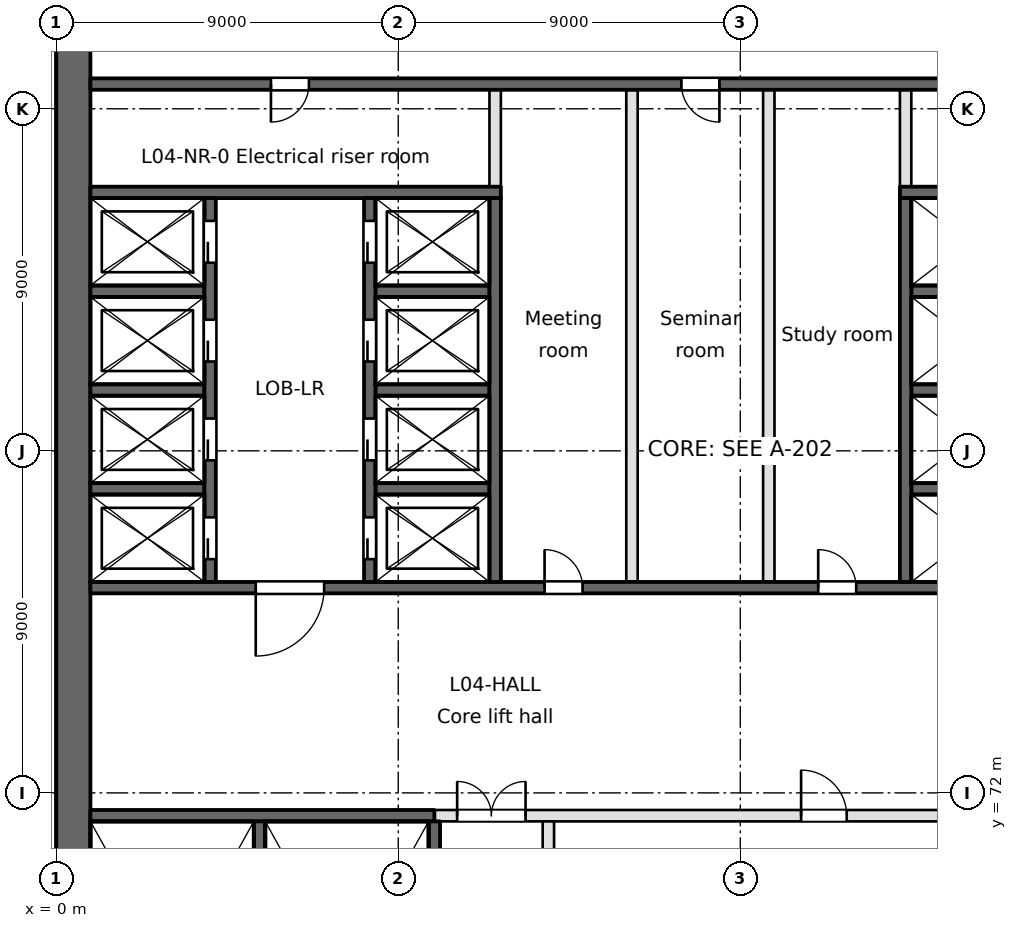
"""IFC4 building model, lengths in metres.
Left out: names, types, materials, properties, quantities, classifications, styles, units other than length and angle.
Written with IfcOpenShell. Run it as: python <this file> out.ifc"""

import sys

from ifc_helpers import new_model, si_unit, direction, frame, frame_2d, origin, place, context, subcontext, project, spatial, rectangle, extrude, element, fill, save


model = new_model("IFC4")
c1 = context("Model", 3, precision=1e-05, world=origin(), true_north=direction((0.0, 1.0)))
c2 = subcontext(c1, "Body", "Model", "MODEL_VIEW")
j1 = project(units=[si_unit("LENGTHUNIT", "METRE"), si_unit("PLANEANGLEUNIT", "RADIAN")], contexts=[c1])
p1 = place(None, origin())
s1 = spatial("IfcSite", under=j1, at=p1, CompositionType="ELEMENT")
p2 = place(p1, origin())
s2 = spatial("IfcBuilding", under=s1, at=p2, CompositionType="ELEMENT")
p3 = place(p2, frame((0.0, 0.0, 21.6)))
s3 = spatial("IfcBuildingStorey", under=s2, at=p3, CompositionType="ELEMENT", Elevation=21.6)
p4 = place(p3, frame((0.45, 94.5, 0.0), z_axis=(0.0, 0.0, 1.0), x_axis=(0.0, -1.0, 0.0)))
e1 = element("IfcWall", 1, at=p4, inside=s3, PredefinedType="SHEAR", context=c2, shape_type="SweptSolid", body=[
    extrude(rectangle(XDim=66.085, YDim=0.9, at=frame_2d((33.042, 0.0))), origin(), (0.0, 0.0, 1.0), 4.8),
])
p5 = place(p3, frame((0.9, 71.4, -0.35), z_axis=(0.0, 0.0, 1.0), x_axis=(1.0, 0.0, 0.0)))
e2 = element("IfcWall", 2, at=p5, inside=s3, PredefinedType="SOLIDWALL", context=c2, shape_type="SweptSolid", body=[
    extrude(rectangle(XDim=9.05, YDim=0.3, at=frame_2d((4.525, 0.0))), origin(), (0.0, 0.0, 1.0), 4.8),
])
p6 = place(p3, frame((9.95, 71.4, 0.0), z_axis=(0.0, 0.0, 1.0), x_axis=(1.0, 0.0, 0.0)))
e3 = element("IfcWall", 3, at=p6, inside=s3, PredefinedType="PARTITIONING", context=c2, shape_type="SweptSolid", body=[
    extrude(rectangle(XDim=17.65, YDim=0.3, at=frame_2d((8.825, 0.0))), origin(), (0.0, 0.0, 1.0), 4.45),
])
p7 = place(p6, frame((0.6, 0.0, 0.0)))
e4 = element("IfcOpeningElement", 4, at=p7, cuts=e3, PredefinedType="OPENING", context=c2, shape_type="SweptSolid", body=[
    extrude(rectangle(XDim=1.8, YDim=2.1, at=frame_2d((0.9, 1.05))), frame((0.0, 0.15, 0.0), z_axis=(0.0, -1.0, 0.0), x_axis=(1.0, 0.0, 0.0)), (0.0, 0.0, 1.0), 0.3),
])
p8 = place(p6, frame((9.65, 0.0, 0.0)))
e5 = element("IfcOpeningElement", 5, at=p8, cuts=e3, PredefinedType="OPENING", context=c2, shape_type="SweptSolid", body=[
    extrude(rectangle(XDim=1.2, YDim=2.1, at=frame_2d((0.6, 1.05))), frame((0.0, 0.15, 0.0), z_axis=(0.0, -1.0, 0.0), x_axis=(1.0, 0.0, 0.0)), (0.0, 0.0, 1.0), 0.3),
])
p9 = place(p3, frame((0.9, 77.4, -0.35), z_axis=(0.0, 0.0, 1.0), x_axis=(1.0, 0.0, 0.0)))
e6 = element("IfcWall", 6, at=p9, inside=s3, PredefinedType="SOLIDWALL", context=c2, shape_type="SweptSolid", body=[
    extrude(rectangle(XDim=28.95, YDim=0.3, at=frame_2d((14.475, 0.0))), origin(), (0.0, 0.0, 1.0), 4.8),
])
p10 = place(p9, frame((4.35, 0.0, 0.35)))
e7 = element("IfcOpeningElement", 7, at=p10, cuts=e6, PredefinedType="OPENING", context=c2, shape_type="SweptSolid", body=[
    extrude(rectangle(XDim=1.8, YDim=2.1, at=frame_2d((0.9, 1.05))), frame((0.0, 0.15, 0.0), z_axis=(0.0, -1.0, 0.0), x_axis=(1.0, 0.0, 0.0)), (0.0, 0.0, 1.0), 0.3),
])
p11 = place(p9, frame((25.95, 0.0, 0.35)))
e8 = element("IfcOpeningElement", 8, at=p11, cuts=e6, PredefinedType="OPENING", context=c2, shape_type="SweptSolid", body=[
    extrude(rectangle(XDim=1.8, YDim=2.1, at=frame_2d((0.9, 1.05))), frame((0.0, 0.15, 0.0), z_axis=(0.0, -1.0, 0.0), x_axis=(1.0, 0.0, 0.0)), (0.0, 0.0, 1.0), 0.3),
])
p12 = place(p9, frame((11.95, 0.0, 0.35)))
e9 = element("IfcOpeningElement", 9, at=p12, cuts=e6, PredefinedType="OPENING", context=c2, shape_type="SweptSolid", body=[
    extrude(rectangle(XDim=1.0, YDim=2.1, at=frame_2d((0.5, 1.05))), frame((0.0, 0.15, 0.0), z_axis=(0.0, -1.0, 0.0), x_axis=(1.0, 0.0, 0.0)), (0.0, 0.0, 1.0), 0.3),
])
p13 = place(p9, frame((19.15, 0.0, 0.35)))
e10 = element("IfcOpeningElement", 10, at=p13, cuts=e6, PredefinedType="OPENING", context=c2, shape_type="SweptSolid", body=[
    extrude(rectangle(XDim=1.0, YDim=2.1, at=frame_2d((0.5, 1.05))), frame((0.0, 0.15, 0.0), z_axis=(0.0, -1.0, 0.0), x_axis=(1.0, 0.0, 0.0)), (0.0, 0.0, 1.0), 0.3),
])
for number, where, z_axis, x_axis in (
    (11, (0.9, 80.0, -0.35), (0.0, 0.0, 1.0), (1.0, 0.0, 0.0)),
    (12, (8.4, 80.0, -0.35), (0.0, 0.0, 1.0), (1.0, 0.0, 0.0)),
    (13, (22.5, 80.0, -0.35), (0.0, 0.0, 1.0), (1.0, 0.0, 0.0)),
    (14, (0.9, 82.6, -0.35), (0.0, 0.0, 1.0), (1.0, 0.0, 0.0)),
    (15, (8.4, 82.6, -0.35), (0.0, 0.0, 1.0), (1.0, 0.0, 0.0)),
    (16, (22.5, 82.6, -0.35), (0.0, 0.0, 1.0), (1.0, 0.0, 0.0)),
    (17, (0.9, 85.2, -0.35), (0.0, 0.0, 1.0), (1.0, 0.0, 0.0)),
    (18, (8.4, 85.2, -0.35), (0.0, 0.0, 1.0), (1.0, 0.0, 0.0)),
    (19, (22.5, 85.2, -0.35), (0.0, 0.0, 1.0), (1.0, 0.0, 0.0)),
):
    element("IfcWall", number, at=place(p3, frame(where, z_axis=z_axis, x_axis=x_axis)), inside=s3, PredefinedType="SOLIDWALL", context=c2, shape_type="SweptSolid", body=[
        extrude(rectangle(XDim=3.0, YDim=0.3, at=frame_2d((1.5, 0.0))), origin(), (0.0, 0.0, 1.0), 4.8),
    ])
p14 = place(p3, frame((0.9, 87.8, -0.35), z_axis=(0.0, 0.0, 1.0), x_axis=(1.0, 0.0, 0.0)))
e20 = element("IfcWall", 20, at=p14, inside=s3, PredefinedType="SOLIDWALL", context=c2, shape_type="SweptSolid", body=[
    extrude(rectangle(XDim=10.8, YDim=0.3, at=frame_2d((5.4, 0.0))), origin(), (0.0, 0.0, 1.0), 4.8),
])
p15 = place(p3, frame((22.2, 87.8, -0.35), z_axis=(0.0, 0.0, 1.0), x_axis=(1.0, 0.0, 0.0)))
e21 = element("IfcWall", 21, at=p15, inside=s3, PredefinedType="SOLIDWALL", context=c2, shape_type="SweptSolid", body=[
    extrude(rectangle(XDim=7.8, YDim=0.3, at=frame_2d((3.9, 0.0))), origin(), (0.0, 0.0, 1.0), 4.8),
])
p16 = place(p3, frame((0.9, 90.65, -0.35), z_axis=(0.0, 0.0, 1.0), x_axis=(1.0, 0.0, 0.0)))
e22 = element("IfcWall", 22, at=p16, inside=s3, PredefinedType="SOLIDWALL", context=c2, shape_type="SweptSolid", body=[
    extrude(rectangle(XDim=34.6, YDim=0.3, at=frame_2d((17.3, 0.0))), origin(), (0.0, 0.0, 1.0), 4.8),
])
p17 = place(p16, frame((4.75, 0.0, 0.35)))
e23 = element("IfcOpeningElement", 23, at=p17, cuts=e22, PredefinedType="OPENING", context=c2, shape_type="SweptSolid", body=[
    extrude(rectangle(XDim=1.0, YDim=2.1, at=frame_2d((0.5, 1.05))), frame((0.0, 0.15, 0.0), z_axis=(0.0, -1.0, 0.0), x_axis=(1.0, 0.0, 0.0)), (0.0, 0.0, 1.0), 0.3),
])
p18 = place(p16, frame((24.7, 0.0, 0.35)))
e24 = element("IfcOpeningElement", 24, at=p18, cuts=e22, PredefinedType="OPENING", context=c2, shape_type="SweptSolid", body=[
    extrude(rectangle(XDim=1.0, YDim=2.1, at=frame_2d((0.5, 1.05))), frame((0.0, 0.15, 0.0), z_axis=(0.0, -1.0, 0.0), x_axis=(1.0, 0.0, 0.0)), (0.0, 0.0, 1.0), 0.3),
])
p19 = place(p16, frame((15.55, 0.0, 0.35)))
e25 = element("IfcOpeningElement", 25, at=p19, cuts=e22, PredefinedType="OPENING", context=c2, shape_type="SweptSolid", body=[
    extrude(rectangle(XDim=1.0, YDim=2.1, at=frame_2d((0.5, 1.05))), frame((0.0, 0.15, 0.0), z_axis=(0.0, -1.0, 0.0), x_axis=(1.0, 0.0, 0.0)), (0.0, 0.0, 1.0), 0.3),
])
p20 = place(p16, frame((31.4, 0.0, 0.35)))
e26 = element("IfcOpeningElement", 26, at=p20, cuts=e22, PredefinedType="OPENING", context=c2, shape_type="SweptSolid", body=[
    extrude(rectangle(XDim=1.0, YDim=2.1, at=frame_2d((0.5, 1.05))), frame((0.0, 0.15, 0.0), z_axis=(0.0, -1.0, 0.0), x_axis=(1.0, 0.0, 0.0)), (0.0, 0.0, 1.0), 0.3),
])
p21 = place(p3, frame((4.05, 77.55, -0.35), z_axis=(0.0, 0.0, 1.0), x_axis=(0.0, 1.0, 0.0)))
e27 = element("IfcWall", 27, at=p21, inside=s3, PredefinedType="SOLIDWALL", context=c2, shape_type="SweptSolid", body=[
    extrude(rectangle(XDim=10.1, YDim=0.3, at=frame_2d((5.05, 0.0))), origin(), (0.0, 0.0, 1.0), 4.8),
])
p22 = place(p21, frame((0.6, 0.0, 0.35)))
e28 = element("IfcOpeningElement", 28, at=p22, cuts=e27, PredefinedType="OPENING", context=c2, shape_type="SweptSolid", body=[
    extrude(rectangle(XDim=1.1, YDim=2.1, at=frame_2d((0.55, 1.05))), frame((0.0, 0.15, 0.0), z_axis=(0.0, -1.0, 0.0), x_axis=(1.0, 0.0, 0.0)), (0.0, 0.0, 1.0), 0.3),
])
p23 = place(p21, frame((3.2, 0.0, 0.35)))
e29 = element("IfcOpeningElement", 29, at=p23, cuts=e27, PredefinedType="OPENING", context=c2, shape_type="SweptSolid", body=[
    extrude(rectangle(XDim=1.1, YDim=2.1, at=frame_2d((0.55, 1.05))), frame((0.0, 0.15, 0.0), z_axis=(0.0, -1.0, 0.0), x_axis=(1.0, 0.0, 0.0)), (0.0, 0.0, 1.0), 0.3),
])
p24 = place(p21, frame((5.8, 0.0, 0.35)))
e30 = element("IfcOpeningElement", 30, at=p24, cuts=e27, PredefinedType="OPENING", context=c2, shape_type="SweptSolid", body=[
    extrude(rectangle(XDim=1.1, YDim=2.1, at=frame_2d((0.55, 1.05))), frame((0.0, 0.15, 0.0), z_axis=(0.0, -1.0, 0.0), x_axis=(1.0, 0.0, 0.0)), (0.0, 0.0, 1.0), 0.3),
])
p25 = place(p21, frame((8.4, 0.0, 0.35)))
e31 = element("IfcOpeningElement", 31, at=p25, cuts=e27, PredefinedType="OPENING", context=c2, shape_type="SweptSolid", body=[
    extrude(rectangle(XDim=1.1, YDim=2.1, at=frame_2d((0.55, 1.05))), frame((0.0, 0.15, 0.0), z_axis=(0.0, -1.0, 0.0), x_axis=(1.0, 0.0, 0.0)), (0.0, 0.0, 1.0), 0.3),
])
p26 = place(p3, frame((5.35, 63.5, -0.35), z_axis=(0.0, 0.0, 1.0), x_axis=(0.0, 1.0, 0.0)))
e32 = element("IfcWall", 32, at=p26, inside=s3, PredefinedType="SOLIDWALL", context=c2, shape_type="SweptSolid", body=[
    extrude(rectangle(XDim=7.75, YDim=0.3, at=frame_2d((3.875, 0.0))), origin(), (0.0, 0.0, 1.0), 4.8),
])
p27 = place(p3, frame((8.25, 77.55, -0.35), z_axis=(0.0, 0.0, 1.0), x_axis=(0.0, 1.0, 0.0)))
e33 = element("IfcWall", 33, at=p27, inside=s3, PredefinedType="SOLIDWALL", context=c2, shape_type="SweptSolid", body=[
    extrude(rectangle(XDim=10.1, YDim=0.3, at=frame_2d((5.05, 0.0))), origin(), (0.0, 0.0, 1.0), 4.8),
])
p28 = place(p27, frame((0.6, 0.0, 0.35)))
e34 = element("IfcOpeningElement", 34, at=p28, cuts=e33, PredefinedType="OPENING", context=c2, shape_type="SweptSolid", body=[
    extrude(rectangle(XDim=1.1, YDim=2.1, at=frame_2d((0.55, 1.05))), frame((0.0, 0.15, 0.0), z_axis=(0.0, -1.0, 0.0), x_axis=(1.0, 0.0, 0.0)), (0.0, 0.0, 1.0), 0.3),
])
p29 = place(p27, frame((3.2, 0.0, 0.35)))
e35 = element("IfcOpeningElement", 35, at=p29, cuts=e33, PredefinedType="OPENING", context=c2, shape_type="SweptSolid", body=[
    extrude(rectangle(XDim=1.1, YDim=2.1, at=frame_2d((0.55, 1.05))), frame((0.0, 0.15, 0.0), z_axis=(0.0, -1.0, 0.0), x_axis=(1.0, 0.0, 0.0)), (0.0, 0.0, 1.0), 0.3),
])
p30 = place(p27, frame((5.8, 0.0, 0.35)))
e36 = element("IfcOpeningElement", 36, at=p30, cuts=e33, PredefinedType="OPENING", context=c2, shape_type="SweptSolid", body=[
    extrude(rectangle(XDim=1.1, YDim=2.1, at=frame_2d((0.55, 1.05))), frame((0.0, 0.15, 0.0), z_axis=(0.0, -1.0, 0.0), x_axis=(1.0, 0.0, 0.0)), (0.0, 0.0, 1.0), 0.3),
])
p31 = place(p27, frame((8.4, 0.0, 0.35)))
e37 = element("IfcOpeningElement", 37, at=p31, cuts=e33, PredefinedType="OPENING", context=c2, shape_type="SweptSolid", body=[
    extrude(rectangle(XDim=1.1, YDim=2.1, at=frame_2d((0.55, 1.05))), frame((0.0, 0.15, 0.0), z_axis=(0.0, -1.0, 0.0), x_axis=(1.0, 0.0, 0.0)), (0.0, 0.0, 1.0), 0.3),
])
p32 = place(p3, frame((9.95, 63.5, -0.35), z_axis=(0.0, 0.0, 1.0), x_axis=(0.0, 1.0, 0.0)))
e38 = element("IfcWall", 38, at=p32, inside=s3, PredefinedType="SOLIDWALL", context=c2, shape_type="SweptSolid", body=[
    extrude(rectangle(XDim=7.75, YDim=0.3, at=frame_2d((3.875, 0.0))), origin(), (0.0, 0.0, 1.0), 4.8),
])
p33 = place(p3, frame((11.55, 77.55, -0.35), z_axis=(0.0, 0.0, 1.0), x_axis=(0.0, 1.0, 0.0)))
e39 = element("IfcWall", 39, at=p33, inside=s3, PredefinedType="SOLIDWALL", context=c2, shape_type="SweptSolid", body=[
    extrude(rectangle(XDim=10.1, YDim=0.3, at=frame_2d((5.05, 0.0))), origin(), (0.0, 0.0, 1.0), 4.8),
])
p34 = place(p3, frame((11.55, 87.95, 0.0), z_axis=(0.0, 0.0, 1.0), x_axis=(0.0, 1.0, 0.0)))
e40 = element("IfcWall", 40, at=p34, inside=s3, PredefinedType="PARTITIONING", context=c2, shape_type="SweptSolid", body=[
    extrude(rectangle(XDim=2.55, YDim=0.3, at=frame_2d((1.275, 0.0))), origin(), (0.0, 0.0, 1.0), 4.45),
])
p35 = place(p3, frame((12.95, 63.5, 0.0), z_axis=(0.0, 0.0, 1.0), x_axis=(0.0, 1.0, 0.0)))
e41 = element("IfcWall", 41, at=p35, inside=s3, PredefinedType="PARTITIONING", context=c2, shape_type="SweptSolid", body=[
    extrude(rectangle(XDim=7.75, YDim=0.3, at=frame_2d((3.875, 0.0))), origin(), (0.0, 0.0, 1.0), 4.45),
])
for number, where, z_axis, x_axis in (
    (42, (15.15, 77.55, 0.0), (0.0, 0.0, 1.0), (0.0, 1.0, 0.0)),
    (43, (18.75, 77.55, 0.0), (0.0, 0.0, 1.0), (0.0, 1.0, 0.0)),
):
    element("IfcWall", number, at=place(p3, frame(where, z_axis=z_axis, x_axis=x_axis)), inside=s3, PredefinedType="PARTITIONING", context=c2, shape_type="SweptSolid", body=[
        extrude(rectangle(XDim=12.95, YDim=0.3, at=frame_2d((6.475, 0.0))), origin(), (0.0, 0.0, 1.0), 4.45),
    ])
p36 = place(p3, frame((22.35, 77.55, -0.35), z_axis=(0.0, 0.0, 1.0), x_axis=(0.0, 1.0, 0.0)))
e44 = element("IfcWall", 44, at=p36, inside=s3, PredefinedType="SOLIDWALL", context=c2, shape_type="SweptSolid", body=[
    extrude(rectangle(XDim=10.1, YDim=0.3, at=frame_2d((5.05, 0.0))), origin(), (0.0, 0.0, 1.0), 4.8),
])
p37 = place(p3, frame((22.35, 87.95, 0.0), z_axis=(0.0, 0.0, 1.0), x_axis=(0.0, 1.0, 0.0)))
e45 = element("IfcWall", 45, at=p37, inside=s3, PredefinedType="PARTITIONING", context=c2, shape_type="SweptSolid", body=[
    extrude(rectangle(XDim=2.55, YDim=0.3, at=frame_2d((1.275, 0.0))), origin(), (0.0, 0.0, 1.0), 4.45),
])
p38 = place(p22, origin())
e46 = element("IfcDoor", 46, at=p38, inside=s3, OperationType="SLIDING_TO_RIGHT", PredefinedType="DOOR", context=c2, shape_type="SweptSolid", body=[
    extrude(rectangle(XDim=1.1, YDim=2.1, at=frame_2d((0.55, 1.05))), frame((0.0, 0.025, 0.0), z_axis=(0.0, -1.0, 0.0), x_axis=(1.0, 0.0, 0.0)), (0.0, 0.0, 1.0), 0.05),
])
fill(e28, e46)
p39 = place(p23, origin())
e47 = element("IfcDoor", 47, at=p39, inside=s3, OperationType="SLIDING_TO_LEFT", PredefinedType="DOOR", context=c2, shape_type="SweptSolid", body=[
    extrude(rectangle(XDim=1.1, YDim=2.1, at=frame_2d((0.55, 1.05))), frame((0.0, 0.025, 0.0), z_axis=(0.0, -1.0, 0.0), x_axis=(1.0, 0.0, 0.0)), (0.0, 0.0, 1.0), 0.05),
])
fill(e29, e47)
p40 = place(p24, origin())
e48 = element("IfcDoor", 48, at=p40, inside=s3, OperationType="SLIDING_TO_RIGHT", PredefinedType="DOOR", context=c2, shape_type="SweptSolid", body=[
    extrude(rectangle(XDim=1.1, YDim=2.1, at=frame_2d((0.55, 1.05))), frame((0.0, 0.025, 0.0), z_axis=(0.0, -1.0, 0.0), x_axis=(1.0, 0.0, 0.0)), (0.0, 0.0, 1.0), 0.05),
])
fill(e30, e48)
p41 = place(p25, origin())
e49 = element("IfcDoor", 49, at=p41, inside=s3, OperationType="SLIDING_TO_LEFT", PredefinedType="DOOR", context=c2, shape_type="SweptSolid", body=[
    extrude(rectangle(XDim=1.1, YDim=2.1, at=frame_2d((0.55, 1.05))), frame((0.0, 0.025, 0.0), z_axis=(0.0, -1.0, 0.0), x_axis=(1.0, 0.0, 0.0)), (0.0, 0.0, 1.0), 0.05),
])
fill(e31, e49)
p42 = place(p28, origin())
e50 = element("IfcDoor", 50, at=p42, inside=s3, OperationType="SLIDING_TO_RIGHT", PredefinedType="DOOR", context=c2, shape_type="SweptSolid", body=[
    extrude(rectangle(XDim=1.1, YDim=2.1, at=frame_2d((0.55, 1.05))), frame((0.0, 0.025, 0.0), z_axis=(0.0, -1.0, 0.0), x_axis=(1.0, 0.0, 0.0)), (0.0, 0.0, 1.0), 0.05),
])
fill(e34, e50)
p43 = place(p29, origin())
e51 = element("IfcDoor", 51, at=p43, inside=s3, OperationType="SLIDING_TO_LEFT", PredefinedType="DOOR", context=c2, shape_type="SweptSolid", body=[
    extrude(rectangle(XDim=1.1, YDim=2.1, at=frame_2d((0.55, 1.05))), frame((0.0, 0.025, 0.0), z_axis=(0.0, -1.0, 0.0), x_axis=(1.0, 0.0, 0.0)), (0.0, 0.0, 1.0), 0.05),
])
fill(e35, e51)
p44 = place(p30, origin())
e52 = element("IfcDoor", 52, at=p44, inside=s3, OperationType="SLIDING_TO_RIGHT", PredefinedType="DOOR", context=c2, shape_type="SweptSolid", body=[
    extrude(rectangle(XDim=1.1, YDim=2.1, at=frame_2d((0.55, 1.05))), frame((0.0, 0.025, 0.0), z_axis=(0.0, -1.0, 0.0), x_axis=(1.0, 0.0, 0.0)), (0.0, 0.0, 1.0), 0.05),
])
fill(e36, e52)
p45 = place(p31, origin())
e53 = element("IfcDoor", 53, at=p45, inside=s3, OperationType="SLIDING_TO_LEFT", PredefinedType="DOOR", context=c2, shape_type="SweptSolid", body=[
    extrude(rectangle(XDim=1.1, YDim=2.1, at=frame_2d((0.55, 1.05))), frame((0.0, 0.025, 0.0), z_axis=(0.0, -1.0, 0.0), x_axis=(1.0, 0.0, 0.0)), (0.0, 0.0, 1.0), 0.05),
])
fill(e37, e53)
p46 = place(p10, frame((1.8, 0.0, 0.0), z_axis=(0.0, 0.0, 1.0), x_axis=(-1.0, 0.0, 0.0)))
e54 = element("IfcDoor", 54, at=p46, inside=s3, OperationType="SINGLE_SWING_RIGHT", PredefinedType="DOOR", context=c2, shape_type="SweptSolid", body=[
    extrude(rectangle(XDim=1.8, YDim=2.1, at=frame_2d((0.9, 1.05))), frame((0.0, 0.025, 0.0), z_axis=(0.0, -1.0, 0.0), x_axis=(1.0, 0.0, 0.0)), (0.0, 0.0, 1.0), 0.05),
])
fill(e7, e54)
p47 = place(p7, origin())
e55 = element("IfcDoor", 55, at=p47, inside=s3, OperationType="DOUBLE_DOOR_SINGLE_SWING", PredefinedType="DOOR", context=c2, shape_type="SweptSolid", body=[
    extrude(rectangle(XDim=1.8, YDim=2.1, at=frame_2d((0.9, 1.05))), frame((0.0, 0.025, 0.0), z_axis=(0.0, -1.0, 0.0), x_axis=(1.0, 0.0, 0.0)), (0.0, 0.0, 1.0), 0.05),
])
fill(e4, e55)
p48 = place(p8, origin())
e56 = element("IfcDoor", 56, at=p48, inside=s3, OperationType="SINGLE_SWING_LEFT", PredefinedType="DOOR", context=c2, shape_type="SweptSolid", body=[
    extrude(rectangle(XDim=1.2, YDim=2.1, at=frame_2d((0.6, 1.05))), frame((0.0, 0.025, 0.0), z_axis=(0.0, -1.0, 0.0), x_axis=(1.0, 0.0, 0.0)), (0.0, 0.0, 1.0), 0.05),
])
fill(e5, e56)
p49 = place(p17, frame((1.0, 0.0, 0.0), z_axis=(0.0, 0.0, 1.0), x_axis=(-1.0, 0.0, 0.0)))
e57 = element("IfcDoor", 57, at=p49, inside=s3, OperationType="SINGLE_SWING_RIGHT", PredefinedType="DOOR", context=c2, shape_type="SweptSolid", body=[
    extrude(rectangle(XDim=1.0, YDim=2.1, at=frame_2d((0.5, 1.05))), frame((0.0, 0.025, 0.0), z_axis=(0.0, -1.0, 0.0), x_axis=(1.0, 0.0, 0.0)), (0.0, 0.0, 1.0), 0.05),
])
fill(e23, e57)
p50 = place(p12, origin())
e58 = element("IfcDoor", 58, at=p50, inside=s3, OperationType="SINGLE_SWING_LEFT", PredefinedType="DOOR", context=c2, shape_type="SweptSolid", body=[
    extrude(rectangle(XDim=1.0, YDim=2.1, at=frame_2d((0.5, 1.05))), frame((0.0, 0.025, 0.0), z_axis=(0.0, -1.0, 0.0), x_axis=(1.0, 0.0, 0.0)), (0.0, 0.0, 1.0), 0.05),
])
fill(e9, e58)
p51 = place(p19, frame((1.0, 0.0, 0.0), z_axis=(0.0, 0.0, 1.0), x_axis=(-1.0, 0.0, 0.0)))
e59 = element("IfcDoor", 59, at=p51, inside=s3, OperationType="SINGLE_SWING_LEFT", PredefinedType="DOOR", context=c2, shape_type="SweptSolid", body=[
    extrude(rectangle(XDim=1.0, YDim=2.1, at=frame_2d((0.5, 1.05))), frame((0.0, 0.025, 0.0), z_axis=(0.0, -1.0, 0.0), x_axis=(1.0, 0.0, 0.0)), (0.0, 0.0, 1.0), 0.05),
])
fill(e25, e59)
p52 = place(p13, origin())
e60 = element("IfcDoor", 60, at=p52, inside=s3, OperationType="SINGLE_SWING_LEFT", PredefinedType="DOOR", context=c2, shape_type="SweptSolid", body=[
    extrude(rectangle(XDim=1.0, YDim=2.1, at=frame_2d((0.5, 1.05))), frame((0.0, 0.025, 0.0), z_axis=(0.0, -1.0, 0.0), x_axis=(1.0, 0.0, 0.0)), (0.0, 0.0, 1.0), 0.05),
])
fill(e10, e60)
save(model, sys.argv[1])
